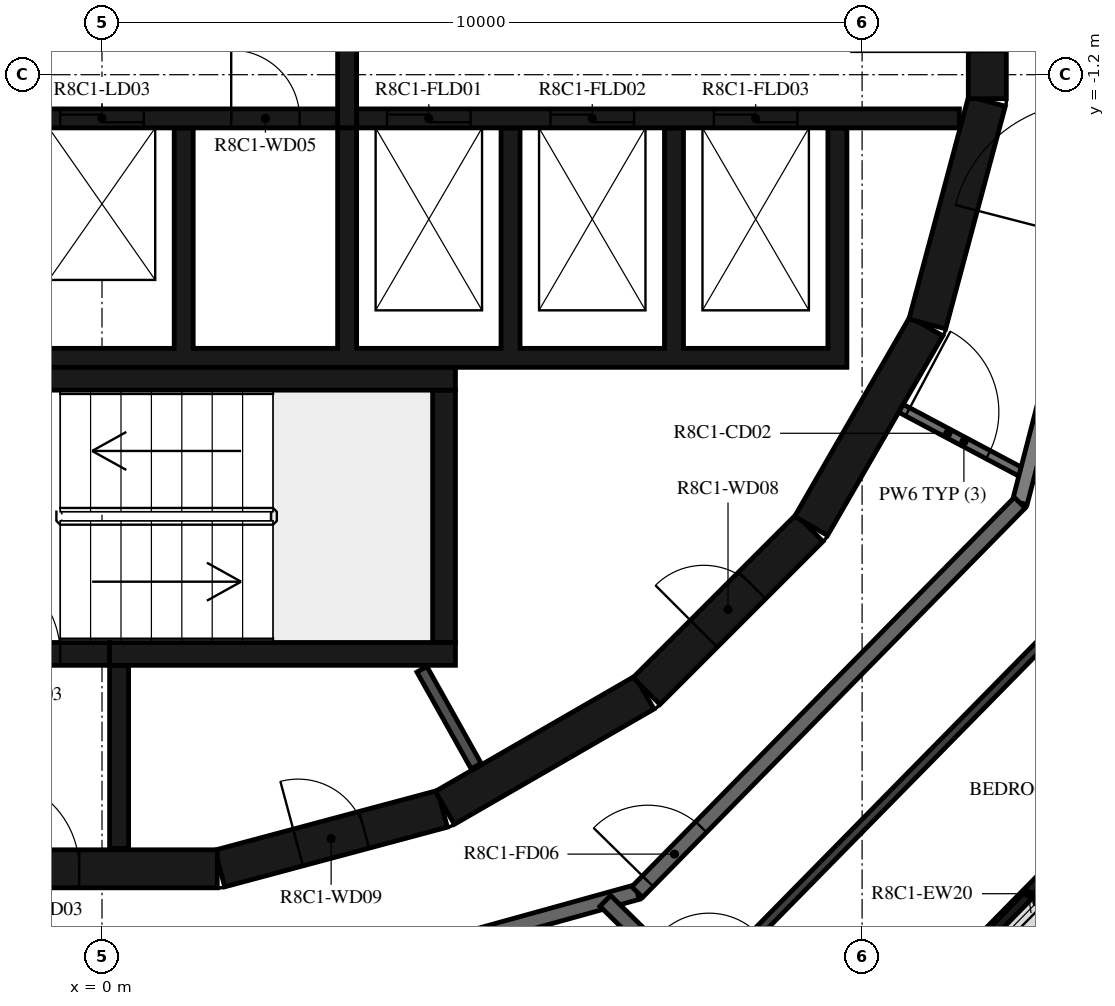
"""IFC4 building model, lengths in metres.
Left out: names, types, materials, properties, quantities, classifications, styles, units other than length and angle.
Written with IfcOpenShell. Run it as: python <this file> out.ifc"""

import sys

from ifc_helpers import new_model, si_unit, direction, frame, frame_2d, origin, place, context, subcontext, project, spatial, polyline, rectangle, outline, extrude, element, fill, save


model = new_model("IFC4")
c1 = context("Model", 3, precision=1e-05, world=origin(), true_north=direction((0.0, 1.0)))
c2 = subcontext(c1, "Body", "Model", "MODEL_VIEW")
j1 = project(units=[si_unit("LENGTHUNIT", "METRE"), si_unit("PLANEANGLEUNIT", "RADIAN")], contexts=[c1])
p1 = place(None, origin())
s1 = spatial("IfcSite", under=j1, at=p1, CompositionType="ELEMENT")
p2 = place(p1, origin())
s2 = spatial("IfcBuilding", under=s1, at=p2, CompositionType="ELEMENT")
p3 = place(p2, frame((0.0, 0.0, 322.7)))
s3 = spatial("IfcBuildingStorey", under=s2, at=p3, CompositionType="ELEMENT", Elevation=322.7)
p4 = place(p3, frame((11.064, -13.116, 0.0), z_axis=(0.0, 0.0, 1.0), x_axis=(0.700900076932, 0.713259477439, 0.0)))
e1 = element("IfcWall", 1, at=p4, inside=s3, PredefinedType="STANDARD", context=c2, shape_type="SweptSolid", body=[
    extrude(rectangle(XDim=3.2, YDim=0.16, at=frame_2d((1.6, 0.0))), origin(), (0.0, 0.0, 1.0), 3.05),
])
p5 = place(p4, frame((0.4, 0.0, 0.0)))
e2 = element("IfcOpeningElement", 2, at=p5, cuts=e1, PredefinedType="OPENING", context=c2, shape_type="SweptSolid", body=[
    extrude(rectangle(XDim=2.4, YDim=2.4, at=frame_2d((1.2, 1.2))), frame((0.0, 0.09, 0.0), z_axis=(0.0, -1.0, 0.0), x_axis=(1.0, 0.0, 0.0)), (0.0, 0.0, 1.0), 0.18),
])
p6 = place(p3, frame((1.55, -11.643, 0.0), z_axis=(0.0, 0.0, 1.0), x_axis=(0.965948410781, 0.258734743916, 0.0)))
e3 = element("IfcWall", 3, at=p6, inside=s3, PredefinedType="SHEAR", context=c2, shape_type="SweptSolid", body=[
    extrude(rectangle(XDim=3.033, YDim=0.5, at=frame_2d((1.516, 0.0))), origin(), (0.0, 0.0, 1.0), 3.05),
])
p7 = place(p6, frame((1.066, 0.0, 0.0)))
e4 = element("IfcOpeningElement", 4, at=p7, cuts=e3, PredefinedType="OPENING", context=c2, shape_type="SweptSolid", body=[
    extrude(rectangle(XDim=0.9, YDim=2.1, at=frame_2d((0.45, 1.05))), frame((0.0, 0.26, 0.0), z_axis=(0.0, -1.0, 0.0), x_axis=(1.0, 0.0, 0.0)), (0.0, 0.0, 1.0), 0.52),
])
p8 = place(p3, frame((4.51, -10.845, 0.0), z_axis=(0.0, 0.0, 1.0), x_axis=(0.865975092491, 0.500087131594, 0.0)))
e5 = element("IfcWall", 5, at=p8, inside=s3, PredefinedType="SHEAR", context=c2, shape_type="SweptSolid", body=[
    extrude(rectangle(XDim=3.033, YDim=0.5, at=frame_2d((1.516, 0.0))), origin(), (0.0, 0.0, 1.0), 3.05),
])
p9 = place(p3, frame((7.164, -9.308, 0.0), z_axis=(0.0, 0.0, 1.0), x_axis=(0.707106781187, 0.707106781187, 0.0)))
e6 = element("IfcWall", 6, at=p9, inside=s3, PredefinedType="SHEAR", context=c2, shape_type="SweptSolid", body=[
    extrude(rectangle(XDim=3.032, YDim=0.5, at=frame_2d((1.516, 0.0))), origin(), (0.0, 0.0, 1.0), 3.05),
])
p10 = place(p9, frame((1.066, 0.0, 0.0)))
e7 = element("IfcOpeningElement", 7, at=p10, cuts=e6, PredefinedType="OPENING", context=c2, shape_type="SweptSolid", body=[
    extrude(rectangle(XDim=0.9, YDim=2.1, at=frame_2d((0.45, 1.05))), frame((0.0, 0.26, 0.0), z_axis=(0.0, -1.0, 0.0), x_axis=(1.0, 0.0, 0.0)), (0.0, 0.0, 1.0), 0.52),
])
for number, where, z_axis, x_axis in (
    (8, (9.329, -7.137, 0.0), (0.0, 0.0, 1.0), (0.5, 0.866, 0.0)),
    (9, (10.858, -4.479, 0.0), (0.0, 0.0, 1.0), (0.259, 0.966, 0.0)),
):
    element("IfcWall", number, at=place(p3, frame(where, z_axis=z_axis, x_axis=x_axis)), inside=s3, PredefinedType="SHEAR", context=c2, shape_type="SweptSolid", body=[
        extrude(rectangle(XDim=3.033, YDim=0.5, at=frame_2d((1.516, 0.0))), origin(), (0.0, 0.0, 1.0), 3.05),
    ])
p11 = place(p3, frame((11.647, -1.516, 0.0), z_axis=(0.0, 0.0, 1.0), x_axis=(0.0, 1.0, 0.0)))
e10 = element("IfcWall", 10, at=p11, inside=s3, PredefinedType="SHEAR", context=c2, shape_type="SweptSolid", body=[
    extrude(rectangle(XDim=3.033, YDim=0.5, at=frame_2d((1.516, 0.0))), origin(), (0.0, 0.0, 1.0), 3.05),
])
p12 = place(p11, frame((0.616, 0.0, 0.0)))
e11 = element("IfcOpeningElement", 11, at=p12, cuts=e10, PredefinedType="OPENING", context=c2, shape_type="SweptSolid", body=[
    extrude(rectangle(XDim=1.8, YDim=2.1, at=frame_2d((0.9, 1.05))), frame((0.0, 0.26, 0.0), z_axis=(0.0, -1.0, 0.0), x_axis=(1.0, 0.0, 0.0)), (0.0, 0.0, 1.0), 0.52),
])
p13 = place(p3, frame((-1.516, -11.647, 0.0), z_axis=(0.0, 0.0, 1.0), x_axis=(1.0, 0.0, 0.0)))
e12 = element("IfcWall", 12, at=p13, inside=s3, PredefinedType="SHEAR", context=c2, shape_type="SweptSolid", body=[
    extrude(rectangle(XDim=3.033, YDim=0.5, at=frame_2d((1.516, 0.0))), origin(), (0.0, 0.0, 1.0), 3.05),
])
p14 = place(p13, frame((0.016, 0.0, 0.0)))
e13 = element("IfcOpeningElement", 13, at=p14, cuts=e12, PredefinedType="OPENING", context=c2, shape_type="SweptSolid", body=[
    extrude(rectangle(XDim=1.2, YDim=2.1, at=frame_2d((0.6, 1.05))), frame((0.0, 0.26, 0.0), z_axis=(0.0, -1.0, 0.0), x_axis=(1.0, 0.0, 0.0)), (0.0, 0.0, 1.0), 0.52),
])
p15 = place(p3, frame((-2.4, -5.2, 0.0), z_axis=(0.0, 0.0, 1.0), x_axis=(1.0, 0.0, 0.0)))
e14 = element("IfcWall", 14, at=p15, inside=s3, PredefinedType="SHEAR", context=c2, shape_type="SweptSolid", body=[
    extrude(rectangle(XDim=7.05, YDim=0.3, at=frame_2d((3.525, 0.0))), origin(), (0.0, 0.0, 1.0), 3.05),
])
p16 = place(p3, frame((4.5, -8.67, 0.0), z_axis=(0.0, 0.0, 1.0), x_axis=(0.0, 1.0, 0.0)))
e15 = element("IfcWall", 15, at=p16, inside=s3, PredefinedType="SHEAR", context=c2, shape_type="SweptSolid", body=[
    extrude(rectangle(XDim=3.32, YDim=0.3, at=frame_2d((1.66, 0.0))), origin(), (0.0, 0.0, 1.0), 3.05),
])
p17 = place(p3, frame((0.1, -8.82, 0.0), z_axis=(0.0, 0.0, 1.0), x_axis=(1.0, 0.0, 0.0)))
e16 = element("IfcWall", 16, at=p17, inside=s3, PredefinedType="SHEAR", context=c2, shape_type="SweptSolid", body=[
    extrude(rectangle(XDim=4.55, YDim=0.3, at=frame_2d((2.275, 0.0))), origin(), (0.0, 0.0, 1.0), 3.05),
])
p18 = place(p3, frame((-2.4, -8.82, 0.0), z_axis=(0.0, 0.0, 1.0), x_axis=(1.0, 0.0, 0.0)))
e17 = element("IfcWall", 17, at=p18, inside=s3, PredefinedType="SHEAR", context=c2, shape_type="SweptSolid", body=[
    extrude(rectangle(XDim=2.5, YDim=0.3, at=frame_2d((1.25, 0.0))), origin(), (0.0, 0.0, 1.0), 3.05),
])
p19 = place(p18, frame((0.65, 0.0, 0.0)))
e18 = element("IfcOpeningElement", 18, at=p19, cuts=e17, PredefinedType="OPENING", context=c2, shape_type="SweptSolid", body=[
    extrude(rectangle(XDim=1.2, YDim=2.1, at=frame_2d((0.6, 1.05))), frame((0.0, 0.16, 0.0), z_axis=(0.0, -1.0, 0.0), x_axis=(1.0, 0.0, 0.0)), (0.0, 0.0, 1.0), 0.32),
])
p20 = place(p3, frame((0.225, -8.97, 0.0), z_axis=(0.0, 0.0, 1.0), x_axis=(0.0, -1.0, 0.0)))
e19 = element("IfcWall", 19, at=p20, inside=s3, PredefinedType="SHEAR", context=c2, shape_type="SweptSolid", body=[
    extrude(rectangle(XDim=2.41, YDim=0.25, at=frame_2d((1.205, 0.0))), origin(), (0.0, 0.0, 1.0), 3.05),
])
p21 = place(p3, origin())
e20 = element("IfcWall", 20, at=p21, inside=s3, PredefinedType="SHEAR", context=c2, shape_type="SweptSolid", body=[
    extrude(outline(polyline([(9.8, -5.05), (9.8, -4.8), (9.8, -1.9), (9.55, -1.9), (9.55, -4.8), (7.65, -4.8), (7.65, -1.9), (7.4, -1.9), (7.4, -4.8), (5.5, -4.8), (5.5, -1.9), (5.25, -1.9), (5.25, -4.8), (3.35, -4.8), (3.35, -1.9), (3.1, -1.9), (3.1, -4.8), (1.2, -4.8), (1.2, -1.9), (0.95, -1.9), (0.95, -4.8), (-0.95, -4.8), (-0.95, -1.9), (-1.2, -1.9), (-1.2, -4.8), (-3.1, -4.8), (-3.1, -1.9), (-3.35, -1.9), (-3.35, -4.8), (-5.25, -4.8), (-5.25, -1.9), (-5.5, -1.9), (-5.5, -4.8), (-9.55, -4.8), (-9.55, -1.9), (-9.8, -1.9), (-9.8, -4.8), (-9.8, -5.05), (9.8, -5.05)])), origin(), (0.0, 0.0, 1.0), 3.05),
])
p22 = place(p3, frame((-11.28, -1.775, 0.0), z_axis=(0.0, 0.0, 1.0), x_axis=(1.0, 0.0, 0.0)))
e21 = element("IfcWall", 21, at=p22, inside=s3, PredefinedType="SHEAR", context=c2, shape_type="SweptSolid", body=[
    extrude(rectangle(XDim=14.38, YDim=0.25, at=frame_2d((7.19, 0.0))), origin(), (0.0, 0.0, 1.0), 3.05),
])
p23 = place(p22, frame((6.43, 0.0, 0.0)))
e22 = element("IfcOpeningElement", 22, at=p23, cuts=e21, PredefinedType="OPENING", context=c2, shape_type="SweptSolid", body=[
    extrude(rectangle(XDim=1.1, YDim=2.1, at=frame_2d((0.55, 1.05))), frame((0.0, 0.135, 0.0), z_axis=(0.0, -1.0, 0.0), x_axis=(1.0, 0.0, 0.0)), (0.0, 0.0, 1.0), 0.27),
])
p24 = place(p22, frame((8.58, 0.0, 0.0)))
e23 = element("IfcOpeningElement", 23, at=p24, cuts=e21, PredefinedType="OPENING", context=c2, shape_type="SweptSolid", body=[
    extrude(rectangle(XDim=1.1, YDim=2.1, at=frame_2d((0.55, 1.05))), frame((0.0, 0.135, 0.0), z_axis=(0.0, -1.0, 0.0), x_axis=(1.0, 0.0, 0.0)), (0.0, 0.0, 1.0), 0.27),
])
p25 = place(p22, frame((10.73, 0.0, 0.0)))
e24 = element("IfcOpeningElement", 24, at=p25, cuts=e21, PredefinedType="OPENING", context=c2, shape_type="SweptSolid", body=[
    extrude(rectangle(XDim=1.1, YDim=2.1, at=frame_2d((0.55, 1.05))), frame((0.0, 0.135, 0.0), z_axis=(0.0, -1.0, 0.0), x_axis=(1.0, 0.0, 0.0)), (0.0, 0.0, 1.0), 0.27),
])
p26 = place(p22, frame((3.305, 0.0, 0.0)))
e25 = element("IfcOpeningElement", 25, at=p26, cuts=e21, PredefinedType="OPENING", context=c2, shape_type="SweptSolid", body=[
    extrude(rectangle(XDim=0.9, YDim=2.1, at=frame_2d((0.45, 1.05))), frame((0.0, 0.135, 0.0), z_axis=(0.0, -1.0, 0.0), x_axis=(1.0, 0.0, 0.0)), (0.0, 0.0, 1.0), 0.27),
])
p27 = place(p22, frame((12.98, 0.0, 0.0)))
e26 = element("IfcOpeningElement", 26, at=p27, cuts=e21, PredefinedType="OPENING", context=c2, shape_type="SweptSolid", body=[
    extrude(rectangle(XDim=0.9, YDim=2.1, at=frame_2d((0.45, 1.05))), frame((0.0, 0.135, 0.0), z_axis=(0.0, -1.0, 0.0), x_axis=(1.0, 0.0, 0.0)), (0.0, 0.0, 1.0), 0.27),
])
p28 = place(p3, frame((3.35, -1.775, 0.0), z_axis=(0.0, 0.0, 1.0), x_axis=(1.0, 0.0, 0.0)))
e27 = element("IfcWall", 27, at=p28, inside=s3, PredefinedType="SHEAR", context=c2, shape_type="SweptSolid", body=[
    extrude(rectangle(XDim=7.93, YDim=0.25, at=frame_2d((3.965, 0.0))), origin(), (0.0, 0.0, 1.0), 3.05),
])
p29 = place(p28, frame((0.4, 0.0, 0.0)))
e28 = element("IfcOpeningElement", 28, at=p29, cuts=e27, PredefinedType="OPENING", context=c2, shape_type="SweptSolid", body=[
    extrude(rectangle(XDim=1.1, YDim=2.4, at=frame_2d((0.55, 1.2))), frame((0.0, 0.135, 0.0), z_axis=(0.0, -1.0, 0.0), x_axis=(1.0, 0.0, 0.0)), (0.0, 0.0, 1.0), 0.27),
])
p30 = place(p28, frame((2.55, 0.0, 0.0)))
e29 = element("IfcOpeningElement", 29, at=p30, cuts=e27, PredefinedType="OPENING", context=c2, shape_type="SweptSolid", body=[
    extrude(rectangle(XDim=1.1, YDim=2.4, at=frame_2d((0.55, 1.2))), frame((0.0, 0.135, 0.0), z_axis=(0.0, -1.0, 0.0), x_axis=(1.0, 0.0, 0.0)), (0.0, 0.0, 1.0), 0.27),
])
p31 = place(p28, frame((4.7, 0.0, 0.0)))
e30 = element("IfcOpeningElement", 30, at=p31, cuts=e27, PredefinedType="OPENING", context=c2, shape_type="SweptSolid", body=[
    extrude(rectangle(XDim=1.1, YDim=2.4, at=frame_2d((0.55, 1.2))), frame((0.0, 0.135, 0.0), z_axis=(0.0, -1.0, 0.0), x_axis=(1.0, 0.0, 0.0)), (0.0, 0.0, 1.0), 0.27),
])
p32 = place(p3, frame((3.225, -1.9, 0.0), z_axis=(0.0, 0.0, 1.0), x_axis=(0.0, 1.0, 0.0)))
e31 = element("IfcWall", 31, at=p32, inside=s3, PredefinedType="SHEAR", context=c2, shape_type="SweptSolid", body=[
    extrude(rectangle(XDim=3.8, YDim=0.25, at=frame_2d((1.9, 0.0))), origin(), (0.0, 0.0, 1.0), 3.05),
])
p33 = place(p3, frame((4.922, -10.296, 0.0), z_axis=(0.0, 0.0, 1.0), x_axis=(-0.48860846254, 0.872503163509, 0.0)))
e32 = element("IfcWall", 32, at=p33, inside=s3, PredefinedType="PARTITIONING", context=c2, shape_type="SweptSolid", body=[
    extrude(rectangle(XDim=1.459, YDim=0.15, at=frame_2d((0.73, 0.0))), origin(), (0.0, 0.0, 1.0), 3.05),
])
p34 = place(p3, frame((10.511, -5.589, 0.0), z_axis=(0.0, 0.0, 1.0), x_axis=(0.882957311919, -0.469453283437, 0.0)))
e33 = element("IfcWall", 33, at=p34, inside=s3, PredefinedType="PARTITIONING", context=c2, shape_type="SweptSolid", body=[
    extrude(rectangle(XDim=1.876, YDim=0.12, at=frame_2d((0.938, 0.0))), origin(), (0.0, 0.0, 1.0), 3.05),
])
p35 = place(p34, frame((0.1, 0.0, 0.0)))
e34 = element("IfcOpeningElement", 34, at=p35, cuts=e33, PredefinedType="OPENING", context=c2, shape_type="SweptSolid", body=[
    extrude(rectangle(XDim=1.2, YDim=2.1, at=frame_2d((0.6, 1.05))), frame((0.0, 0.07, 0.0), z_axis=(0.0, -1.0, 0.0), x_axis=(1.0, 0.0, 0.0)), (0.0, 0.0, 1.0), 0.14),
])
p36 = place(p3, frame((12.074, -6.831, 0.0), z_axis=(0.0, 0.0, 1.0), x_axis=(0.250391063186, 0.968144780225, 0.0)))
e35 = element("IfcWall", 35, at=p36, inside=s3, PredefinedType="STANDARD", context=c2, shape_type="SweptSolid", body=[
    extrude(rectangle(XDim=7.181, YDim=0.2, at=frame_2d((3.591, 0.0))), origin(), (0.0, 0.0, 1.0), 3.05),
])
p37 = place(p36, frame((3.581, 0.0, 0.0)))
e36 = element("IfcOpeningElement", 36, at=p37, cuts=e35, PredefinedType="OPENING", context=c2, shape_type="SweptSolid", body=[
    extrude(rectangle(XDim=1.8, YDim=2.1, at=frame_2d((0.9, 1.05))), frame((0.0, 0.11, 0.0), z_axis=(0.0, -1.0, 0.0), x_axis=(1.0, 0.0, 0.0)), (0.0, 0.0, 1.0), 0.22),
])
p38 = place(p3, frame((-6.831, -12.074, 0.0), z_axis=(0.0, 0.0, 1.0), x_axis=(0.968144780225, -0.250391063186, 0.0)))
e37 = element("IfcWall", 37, at=p38, inside=s3, PredefinedType="STANDARD", context=c2, shape_type="SweptSolid", body=[
    extrude(rectangle(XDim=7.181, YDim=0.2, at=frame_2d((3.591, 0.0))), origin(), (0.0, 0.0, 1.0), 3.05),
])
p39 = place(p38, frame((2.39, 0.0, 0.0)))
e38 = element("IfcOpeningElement", 38, at=p39, cuts=e37, PredefinedType="OPENING", context=c2, shape_type="SweptSolid", body=[
    extrude(rectangle(XDim=1.0, YDim=2.1, at=frame_2d((0.5, 1.05))), frame((0.0, 0.11, 0.0), z_axis=(0.0, -1.0, 0.0), x_axis=(1.0, 0.0, 0.0)), (0.0, 0.0, 1.0), 0.22),
])
p40 = place(p38, frame((5.69, 0.0, 0.0)))
e39 = element("IfcOpeningElement", 39, at=p40, cuts=e37, PredefinedType="OPENING", context=c2, shape_type="SweptSolid", body=[
    extrude(rectangle(XDim=1.0, YDim=2.1, at=frame_2d((0.5, 1.05))), frame((0.0, 0.11, 0.0), z_axis=(0.0, -1.0, 0.0), x_axis=(1.0, 0.0, 0.0)), (0.0, 0.0, 1.0), 0.22),
])
p41 = place(p3, frame((0.121, -13.872, 0.0), z_axis=(0.0, 0.0, 1.0), x_axis=(0.963625960674, 0.267254575108, 0.0)))
e40 = element("IfcWall", 40, at=p41, inside=s3, PredefinedType="STANDARD", context=c2, shape_type="SweptSolid", body=[
    extrude(rectangle(XDim=7.181, YDim=0.2, at=frame_2d((3.591, 0.0))), origin(), (0.0, 0.0, 1.0), 3.05),
])
p42 = place(p3, frame((7.041, -11.953, 0.0), z_axis=(0.0, 0.0, 1.0), x_axis=(0.70090916255, 0.713250549143, 0.0)))
e41 = element("IfcWall", 41, at=p42, inside=s3, PredefinedType="STANDARD", context=c2, shape_type="SweptSolid", body=[
    extrude(rectangle(XDim=7.181, YDim=0.2, at=frame_2d((3.59, 0.0))), origin(), (0.0, 0.0, 1.0), 3.05),
])
p43 = place(p42, frame((0.2, 0.0, 0.0)))
e42 = element("IfcOpeningElement", 42, at=p43, cuts=e41, PredefinedType="OPENING", context=c2, shape_type="SweptSolid", body=[
    extrude(rectangle(XDim=1.0, YDim=2.1, at=frame_2d((0.5, 1.05))), frame((0.0, 0.11, 0.0), z_axis=(0.0, -1.0, 0.0), x_axis=(1.0, 0.0, 0.0)), (0.0, 0.0, 1.0), 0.22),
])
p44 = place(p3, frame((9.462, -14.861, 0.0), z_axis=(0.0, 0.0, 1.0), x_axis=(-0.713302018318, 0.700856783276, 0.0)))
e43 = element("IfcWall", 43, at=p44, inside=s3, PredefinedType="STANDARD", context=c2, shape_type="SweptSolid", body=[
    extrude(rectangle(XDim=3.982, YDim=0.2, at=frame_2d((1.991, 0.0))), origin(), (0.0, 0.0, 1.0), 3.05),
])
p45 = place(p3, frame((7.846, -13.273, 0.0), z_axis=(0.0, 0.0, 1.0), x_axis=(0.700911018066, 0.713248725728, 0.0)))
e44 = element("IfcWall", 44, at=p45, inside=s3, PredefinedType="PARTITIONING", context=c2, shape_type="SweptSolid", body=[
    extrude(rectangle(XDim=7.935, YDim=0.12, at=frame_2d((3.968, 0.0))), origin(), (0.0, 0.0, 1.0), 3.05),
])
p46 = place(p45, frame((0.2, 0.0, 0.0)))
e45 = element("IfcOpeningElement", 45, at=p46, cuts=e44, PredefinedType="OPENING", context=c2, shape_type="SweptSolid", body=[
    extrude(rectangle(XDim=0.9, YDim=2.1, at=frame_2d((0.45, 1.05))), frame((0.0, 0.07, 0.0), z_axis=(0.0, -1.0, 0.0), x_axis=(1.0, 0.0, 0.0)), (0.0, 0.0, 1.0), 0.14),
])
p47 = place(p5, origin())
e46 = element("IfcDoor", 46, at=p47, inside=s3, OperationType="DOUBLE_DOOR_SLIDING", PredefinedType="DOOR", context=c2, shape_type="SweptSolid", body=[
    extrude(rectangle(XDim=2.4, YDim=2.4, at=frame_2d((1.2, 1.2))), frame((0.0, 0.025, 0.0), z_axis=(0.0, -1.0, 0.0), x_axis=(1.0, 0.0, 0.0)), (0.0, 0.0, 1.0), 0.05),
])
fill(e2, e46)
p48 = place(p19, origin())
e47 = element("IfcDoor", 47, at=p48, inside=s3, OperationType="SINGLE_SWING_LEFT", PredefinedType="DOOR", context=c2, shape_type="SweptSolid", body=[
    extrude(rectangle(XDim=1.2, YDim=2.1, at=frame_2d((0.6, 1.05))), frame((0.0, 0.025, 0.0), z_axis=(0.0, -1.0, 0.0), x_axis=(1.0, 0.0, 0.0)), (0.0, 0.0, 1.0), 0.05),
])
fill(e18, e47)
p49 = place(p14, origin())
e48 = element("IfcDoor", 48, at=p49, inside=s3, OperationType="SINGLE_SWING_RIGHT", PredefinedType="DOOR", context=c2, shape_type="SweptSolid", body=[
    extrude(rectangle(XDim=1.2, YDim=2.1, at=frame_2d((0.6, 1.05))), frame((0.0, 0.025, 0.0), z_axis=(0.0, -1.0, 0.0), x_axis=(1.0, 0.0, 0.0)), (0.0, 0.0, 1.0), 0.05),
])
fill(e13, e48)
p50 = place(p12, origin())
e49 = element("IfcDoor", 49, at=p50, inside=s3, OperationType="DOUBLE_DOOR_SINGLE_SWING", PredefinedType="DOOR", context=c2, shape_type="SweptSolid", body=[
    extrude(rectangle(XDim=1.8, YDim=2.1, at=frame_2d((0.9, 1.05))), frame((0.0, 0.025, 0.0), z_axis=(0.0, -1.0, 0.0), x_axis=(1.0, 0.0, 0.0)), (0.0, 0.0, 1.0), 0.05),
])
fill(e11, e49)
p51 = place(p25, origin())
e50 = element("IfcDoor", 50, at=p51, inside=s3, OperationType="DOUBLE_DOOR_SLIDING", PredefinedType="DOOR", context=c2, shape_type="SweptSolid", body=[
    extrude(rectangle(XDim=1.1, YDim=2.1, at=frame_2d((0.55, 1.05))), frame((0.0, 0.025, 0.0), z_axis=(0.0, -1.0, 0.0), x_axis=(1.0, 0.0, 0.0)), (0.0, 0.0, 1.0), 0.05),
])
fill(e24, e50)
p52 = place(p29, origin())
e51 = element("IfcDoor", 51, at=p52, inside=s3, OperationType="DOUBLE_DOOR_SLIDING", PredefinedType="DOOR", context=c2, shape_type="SweptSolid", body=[
    extrude(rectangle(XDim=1.1, YDim=2.4, at=frame_2d((0.55, 1.2))), frame((0.0, 0.025, 0.0), z_axis=(0.0, -1.0, 0.0), x_axis=(1.0, 0.0, 0.0)), (0.0, 0.0, 1.0), 0.05),
])
fill(e28, e51)
p53 = place(p30, origin())
e52 = element("IfcDoor", 52, at=p53, inside=s3, OperationType="DOUBLE_DOOR_SLIDING", PredefinedType="DOOR", context=c2, shape_type="SweptSolid", body=[
    extrude(rectangle(XDim=1.1, YDim=2.4, at=frame_2d((0.55, 1.2))), frame((0.0, 0.025, 0.0), z_axis=(0.0, -1.0, 0.0), x_axis=(1.0, 0.0, 0.0)), (0.0, 0.0, 1.0), 0.05),
])
fill(e29, e52)
p54 = place(p31, origin())
e53 = element("IfcDoor", 53, at=p54, inside=s3, OperationType="DOUBLE_DOOR_SLIDING", PredefinedType="DOOR", context=c2, shape_type="SweptSolid", body=[
    extrude(rectangle(XDim=1.1, YDim=2.4, at=frame_2d((0.55, 1.2))), frame((0.0, 0.025, 0.0), z_axis=(0.0, -1.0, 0.0), x_axis=(1.0, 0.0, 0.0)), (0.0, 0.0, 1.0), 0.05),
])
fill(e30, e53)
p55 = place(p27, origin())
e54 = element("IfcDoor", 54, at=p55, inside=s3, OperationType="SINGLE_SWING_LEFT", PredefinedType="DOOR", context=c2, shape_type="SweptSolid", body=[
    extrude(rectangle(XDim=0.9, YDim=2.1, at=frame_2d((0.45, 1.05))), frame((0.0, 0.025, 0.0), z_axis=(0.0, -1.0, 0.0), x_axis=(1.0, 0.0, 0.0)), (0.0, 0.0, 1.0), 0.05),
])
fill(e26, e54)
p56 = place(p10, origin())
e55 = element("IfcDoor", 55, at=p56, inside=s3, OperationType="SINGLE_SWING_RIGHT", PredefinedType="DOOR", context=c2, shape_type="SweptSolid", body=[
    extrude(rectangle(XDim=0.9, YDim=2.1, at=frame_2d((0.45, 1.05))), frame((0.0, 0.025, 0.0), z_axis=(0.0, -1.0, 0.0), x_axis=(1.0, 0.0, 0.0)), (0.0, 0.0, 1.0), 0.05),
])
fill(e7, e55)
p57 = place(p7, origin())
e56 = element("IfcDoor", 56, at=p57, inside=s3, OperationType="SINGLE_SWING_LEFT", PredefinedType="DOOR", context=c2, shape_type="SweptSolid", body=[
    extrude(rectangle(XDim=0.9, YDim=2.1, at=frame_2d((0.45, 1.05))), frame((0.0, 0.025, 0.0), z_axis=(0.0, -1.0, 0.0), x_axis=(1.0, 0.0, 0.0)), (0.0, 0.0, 1.0), 0.05),
])
fill(e4, e56)
p58 = place(p43, origin())
e57 = element("IfcDoor", 57, at=p58, inside=s3, OperationType="SINGLE_SWING_LEFT", PredefinedType="DOOR", context=c2, shape_type="SweptSolid", body=[
    extrude(rectangle(XDim=1.0, YDim=2.1, at=frame_2d((0.5, 1.05))), frame((0.0, 0.025, 0.0), z_axis=(0.0, -1.0, 0.0), x_axis=(1.0, 0.0, 0.0)), (0.0, 0.0, 1.0), 0.05),
])
fill(e42, e57)
p59 = place(p35, origin())
e58 = element("IfcDoor", 58, at=p59, inside=s3, OperationType="DOUBLE_DOOR_SINGLE_SWING", PredefinedType="DOOR", context=c2, shape_type="SweptSolid", body=[
    extrude(rectangle(XDim=1.2, YDim=2.1, at=frame_2d((0.6, 1.05))), frame((0.0, 0.025, 0.0), z_axis=(0.0, -1.0, 0.0), x_axis=(1.0, 0.0, 0.0)), (0.0, 0.0, 1.0), 0.05),
])
fill(e34, e58)
save(model, sys.argv[1])
